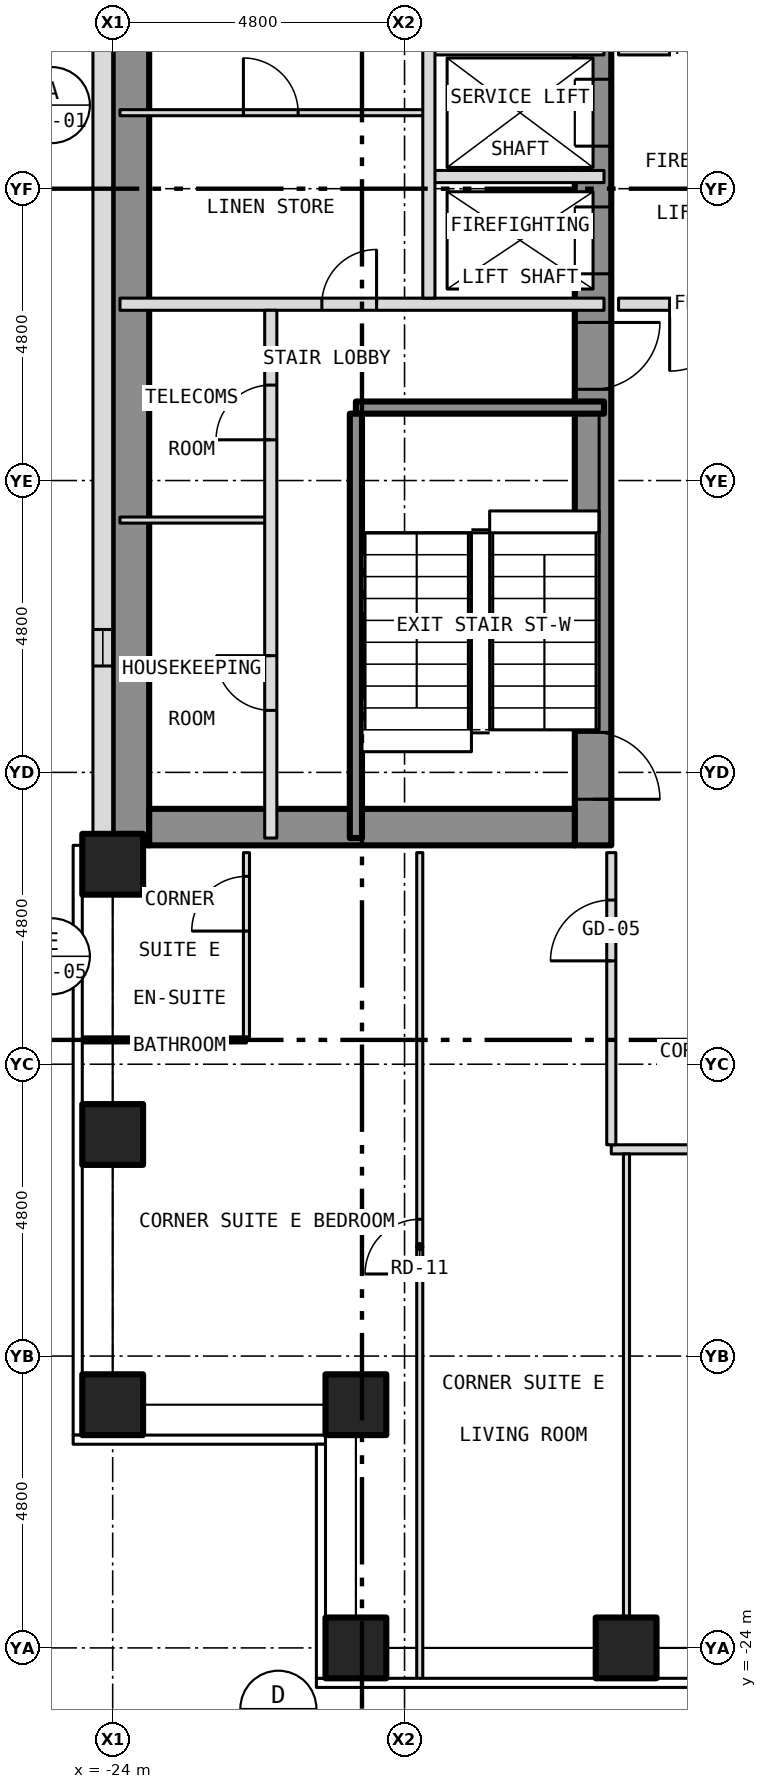
"""IFC4 building model, lengths in metres.
Left out: names, types, materials, properties, quantities, classifications, styles, units other than length and angle.
Written with IfcOpenShell. Run it as: python <this file> out.ifc"""

import sys

from ifc_helpers import new_model, si_unit, direction, frame, frame_2d, origin, origin_2d, place, context, subcontext, project, spatial, rectangle, hollow_rectangle, extrude, element, fill, save


model = new_model("IFC4")
c1 = context("Model", 3, precision=1e-05, world=origin(), true_north=direction((0.0, 1.0)))
c2 = subcontext(c1, "Body", "Model", "MODEL_VIEW")
j1 = project(units=[si_unit("LENGTHUNIT", "METRE"), si_unit("PLANEANGLEUNIT", "RADIAN")], contexts=[c1])
p1 = place(None, origin())
s1 = spatial("IfcSite", under=j1, at=p1, CompositionType="ELEMENT")
p2 = place(p1, origin())
s2 = spatial("IfcBuilding", under=s1, at=p2, CompositionType="ELEMENT")
p3 = place(p2, frame((0.0, 0.0, 67.0)))
s3 = spatial("IfcBuildingStorey", under=s2, at=p3, CompositionType="ELEMENT", Elevation=67.0)
for number, where, z_axis, x_axis in (
    (1, (-20.0, -24.0, -0.15), (0.0, 0.0, 1.0), (1.0, 0.0, 0.0)),
    (2, (-15.556, -24.0, -0.15), (0.0, 0.0, 1.0), (1.0, 0.0, 0.0)),
    (3, (-24.0, -20.0, -0.15), (0.0, 0.0, 1.0), (1.0, 0.0, 0.0)),
    (4, (-24.0, -15.556, -0.15), (0.0, 0.0, 1.0), (1.0, 0.0, 0.0)),
    (5, (-24.0, -11.111, -0.15), (0.0, 0.0, 1.0), (1.0, 0.0, 0.0)),
    (6, (-20.0, -20.0, -0.15), (0.0, 0.0, 1.0), (1.0, 0.0, 0.0)),
):
    element("IfcColumn", number, at=place(p3, frame(where, z_axis=z_axis, x_axis=x_axis)), inside=s3, PredefinedType="COLUMN", context=c2, shape_type="SweptSolid", body=[
        extrude(hollow_rectangle(XDim=1.0, YDim=1.0, WallThickness=0.06, at=origin_2d()), origin(), (0.0, 0.0, 1.0), 3.5),
    ])
p4 = place(p3, frame((-16.1, -10.8, 0.0), z_axis=(0.0, 0.0, 1.0), x_axis=(0.0, 1.0, 0.0)))
e7 = element("IfcWall", 7, at=p4, inside=s3, PredefinedType="SHEAR", context=c2, shape_type="SweptSolid", body=[
    extrude(rectangle(XDim=21.6, YDim=0.6, at=frame_2d((10.8, 0.0))), origin(), (0.0, 0.0, 1.0), 3.25),
])
p5 = place(p4, frame((9.4, 0.0, 0.0)))
e8 = element("IfcOpeningElement", 8, at=p5, cuts=e7, PredefinedType="OPENING", context=c2, shape_type="SweptSolid", body=[
    extrude(rectangle(XDim=1.1, YDim=2.1, at=frame_2d((0.55, 1.05))), frame((0.0, 0.312, 0.0), z_axis=(0.0, -1.0, 0.0), x_axis=(1.0, 0.0, 0.0)), (0.0, 0.0, 1.0), 0.624),
])
p6 = place(p4, frame((11.5, 0.0, 0.0)))
e9 = element("IfcOpeningElement", 9, at=p6, cuts=e7, PredefinedType="OPENING", context=c2, shape_type="SweptSolid", body=[
    extrude(rectangle(XDim=1.1, YDim=2.1, at=frame_2d((0.55, 1.05))), frame((0.0, 0.312, 0.0), z_axis=(0.0, -1.0, 0.0), x_axis=(1.0, 0.0, 0.0)), (0.0, 0.0, 1.0), 0.624),
])
p7 = place(p4, frame((13.6, 0.0, 0.0)))
e10 = element("IfcOpeningElement", 10, at=p7, cuts=e7, PredefinedType="OPENING", context=c2, shape_type="SweptSolid", body=[
    extrude(rectangle(XDim=1.1, YDim=2.1, at=frame_2d((0.55, 1.05))), frame((0.0, 0.312, 0.0), z_axis=(0.0, -1.0, 0.0), x_axis=(1.0, 0.0, 0.0)), (0.0, 0.0, 1.0), 0.624),
])
p8 = place(p4, frame((15.7, 0.0, 0.0)))
e11 = element("IfcOpeningElement", 11, at=p8, cuts=e7, PredefinedType="OPENING", context=c2, shape_type="SweptSolid", body=[
    extrude(rectangle(XDim=1.1, YDim=2.1, at=frame_2d((0.55, 1.05))), frame((0.0, 0.312, 0.0), z_axis=(0.0, -1.0, 0.0), x_axis=(1.0, 0.0, 0.0)), (0.0, 0.0, 1.0), 0.624),
])
p9 = place(p4, frame((17.8, 0.0, 0.0)))
e12 = element("IfcOpeningElement", 12, at=p9, cuts=e7, PredefinedType="OPENING", context=c2, shape_type="SweptSolid", body=[
    extrude(rectangle(XDim=1.1, YDim=2.1, at=frame_2d((0.55, 1.05))), frame((0.0, 0.312, 0.0), z_axis=(0.0, -1.0, 0.0), x_axis=(1.0, 0.0, 0.0)), (0.0, 0.0, 1.0), 0.624),
])
p10 = place(p4, frame((0.758, 0.0, 0.0)))
e13 = element("IfcOpeningElement", 13, at=p10, cuts=e7, PredefinedType="OPENING", context=c2, shape_type="SweptSolid", body=[
    extrude(rectangle(XDim=1.1, YDim=2.1, at=frame_2d((0.55, 1.05))), frame((0.0, 0.312, 0.0), z_axis=(0.0, -1.0, 0.0), x_axis=(1.0, 0.0, 0.0)), (0.0, 0.0, 1.0), 0.624),
])
p11 = place(p4, frame((7.5, 0.0, 0.0)))
e14 = element("IfcOpeningElement", 14, at=p11, cuts=e7, PredefinedType="OPENING", context=c2, shape_type="SweptSolid", body=[
    extrude(rectangle(XDim=1.1, YDim=2.1, at=frame_2d((0.55, 1.05))), frame((0.0, 0.312, 0.0), z_axis=(0.0, -1.0, 0.0), x_axis=(1.0, 0.0, 0.0)), (0.0, 0.0, 1.0), 0.624),
])
p12 = place(p3, frame((-23.7, -10.8, 0.0), z_axis=(0.0, 0.0, 1.0), x_axis=(0.0, 1.0, 0.0)))
e15 = element("IfcWall", 15, at=p12, inside=s3, PredefinedType="SHEAR", context=c2, shape_type="SweptSolid", body=[
    extrude(rectangle(XDim=21.6, YDim=0.6, at=frame_2d((10.8, 0.0))), origin(), (0.0, 0.0, 1.0), 3.25),
])
p13 = place(p3, frame((-23.4, -10.5, 0.0), z_axis=(0.0, 0.0, 1.0), x_axis=(1.0, 0.0, 0.0)))
e16 = element("IfcWall", 16, at=p13, inside=s3, PredefinedType="SHEAR", context=c2, shape_type="SweptSolid", body=[
    extrude(rectangle(XDim=7.0, YDim=0.6, at=frame_2d((3.5, 0.0))), origin(), (0.0, 0.0, 1.0), 3.25),
])
p14 = place(p3, frame((-24.163, 10.8, 0.0), z_axis=(0.0, 0.0, 1.0), x_axis=(0.0, -1.0, 0.0)))
e17 = element("IfcWall", 17, at=p14, inside=s3, PredefinedType="SOLIDWALL", context=c2, shape_type="SweptSolid", body=[
    extrude(rectangle(XDim=21.6, YDim=0.325, at=frame_2d((10.8, 0.0))), origin(), (0.0, 0.0, 1.0), 3.5),
])
p15 = place(p14, frame((18.05, 0.0, 1.0)))
e18 = element("IfcOpeningElement", 18, at=p15, cuts=e17, PredefinedType="OPENING", context=c2, shape_type="SweptSolid", body=[
    extrude(rectangle(XDim=0.6, YDim=1.5, at=frame_2d((0.3, 0.75))), frame((0.0, 0.175, 0.0), z_axis=(0.0, -1.0, 0.0), x_axis=(1.0, 0.0, 0.0)), (0.0, 0.0, 1.0), 0.349),
])
p16 = place(p3, frame((-15.8, -15.8, 0.0), z_axis=(0.0, 0.0, 1.0), x_axis=(1.0, 0.0, 0.0)))
e19 = element("IfcWall", 19, at=p16, inside=s3, PredefinedType="PARTITIONING", context=c2, shape_type="SweptSolid", body=[
    extrude(rectangle(XDim=6.65, YDim=0.15, at=frame_2d((3.325, 0.0))), origin(), (0.0, 0.0, 1.0), 3.35),
])
p17 = place(p16, frame((1.847, 0.0, 0.0)))
e20 = element("IfcOpeningElement", 20, at=p17, cuts=e19, PredefinedType="OPENING", context=c2, shape_type="SweptSolid", body=[
    extrude(rectangle(XDim=1.0, YDim=2.1, at=frame_2d((0.5, 1.05))), frame((0.0, 0.087, 0.0), z_axis=(0.0, -1.0, 0.0), x_axis=(1.0, 0.0, 0.0)), (0.0, 0.0, 1.0), 0.174),
])
p18 = place(p3, frame((-24.53, -14.0, 0.0), z_axis=(0.0, 0.0, 1.0), x_axis=(1.0, 0.0, 0.0)))
e21 = element("IfcWall", 21, at=p18, inside=s3, PredefinedType="PARTITIONING", context=c2, shape_type="SweptSolid", body=[
    extrude(rectangle(XDim=2.73, YDim=0.1, at=frame_2d((1.365, 0.0))), origin(), (0.0, 0.0, 1.0), 3.35),
])
p19 = place(p3, frame((-23.88, -5.45, 0.0), z_axis=(0.0, 0.0, 1.0), x_axis=(1.0, 0.0, 0.0)))
e22 = element("IfcWall", 22, at=p19, inside=s3, PredefinedType="PARTITIONING", context=c2, shape_type="SweptSolid", body=[
    extrude(rectangle(XDim=2.48, YDim=0.1, at=frame_2d((1.24, 0.0))), origin(), (0.0, 0.0, 1.0), 3.25),
])
p20 = place(p3, frame((-20.0, -3.6, 0.0), z_axis=(0.0, 0.0, 1.0), x_axis=(1.0, 0.0, 0.0)))
e23 = element("IfcWall", 23, at=p20, inside=s3, PredefinedType="SHEAR", context=c2, shape_type="SweptSolid", body=[
    extrude(rectangle(XDim=4.08, YDim=0.2, at=frame_2d((2.04, 0.0))), origin(), (0.0, 0.0, 1.0), 3.25),
])
p21 = place(p3, frame((-23.88, -1.9, 0.0), z_axis=(0.0, 0.0, 1.0), x_axis=(1.0, 0.0, 0.0)))
e24 = element("IfcWall", 24, at=p21, inside=s3, PredefinedType="PARTITIONING", context=c2, shape_type="SweptSolid", body=[
    extrude(rectangle(XDim=7.96, YDim=0.2, at=frame_2d((3.98, 0.0))), origin(), (0.0, 0.0, 1.0), 3.25),
])
p22 = place(p21, frame((3.32, 0.0, 0.0)))
e25 = element("IfcOpeningElement", 25, at=p22, cuts=e24, PredefinedType="OPENING", context=c2, shape_type="SweptSolid", body=[
    extrude(rectangle(XDim=0.9, YDim=2.1, at=frame_2d((0.45, 1.05))), frame((0.0, 0.112, 0.0), z_axis=(0.0, -1.0, 0.0), x_axis=(1.0, 0.0, 0.0)), (0.0, 0.0, 1.0), 0.224),
])
p23 = place(p3, frame((-15.68, -1.9, 0.0), z_axis=(0.0, 0.0, 1.0), x_axis=(1.0, 0.0, 0.0)))
e26 = element("IfcWall", 26, at=p23, inside=s3, PredefinedType="PARTITIONING", context=c2, shape_type="SweptSolid", body=[
    extrude(rectangle(XDim=3.28, YDim=0.2, at=frame_2d((1.64, 0.0))), origin(), (0.0, 0.0, 1.0), 3.35),
])
p24 = place(p23, frame((0.84, 0.0, 0.0)))
e27 = element("IfcOpeningElement", 27, at=p24, cuts=e26, PredefinedType="OPENING", context=c2, shape_type="SweptSolid", body=[
    extrude(rectangle(XDim=1.1, YDim=2.1, at=frame_2d((0.55, 1.05))), frame((0.0, 0.112, 0.0), z_axis=(0.0, -1.0, 0.0), x_axis=(1.0, 0.0, 0.0)), (0.0, 0.0, 1.0), 0.224),
])
p25 = place(p3, frame((-18.8, 0.2, 0.0), z_axis=(0.0, 0.0, 1.0), x_axis=(1.0, 0.0, 0.0)))
e28 = element("IfcWall", 28, at=p25, inside=s3, PredefinedType="PARTITIONING", context=c2, shape_type="SweptSolid", body=[
    extrude(rectangle(XDim=2.88, YDim=0.2, at=frame_2d((1.44, 0.0))), origin(), (0.0, 0.0, 1.0), 3.25),
])
p26 = place(p3, frame((-23.88, 1.25, 0.0), z_axis=(0.0, 0.0, 1.0), x_axis=(1.0, 0.0, 0.0)))
e29 = element("IfcWall", 29, at=p26, inside=s3, PredefinedType="PARTITIONING", context=c2, shape_type="SweptSolid", body=[
    extrude(rectangle(XDim=5.08, YDim=0.1, at=frame_2d((2.54, 0.0))), origin(), (0.0, 0.0, 1.0), 3.25),
])
p27 = place(p26, frame((2.03, 0.0, 0.0)))
e30 = element("IfcOpeningElement", 30, at=p27, cuts=e29, PredefinedType="OPENING", context=c2, shape_type="SweptSolid", body=[
    extrude(rectangle(XDim=0.9, YDim=2.1, at=frame_2d((0.45, 1.05))), frame((0.0, 0.062, 0.0), z_axis=(0.0, -1.0, 0.0), x_axis=(1.0, 0.0, 0.0)), (0.0, 0.0, 1.0), 0.124),
])
p28 = place(p3, frame((-18.8, 2.3, 0.0), z_axis=(0.0, 0.0, 1.0), x_axis=(1.0, 0.0, 0.0)))
e31 = element("IfcWall", 31, at=p28, inside=s3, PredefinedType="PARTITIONING", context=c2, shape_type="SweptSolid", body=[
    extrude(rectangle(XDim=2.88, YDim=0.2, at=frame_2d((1.44, 0.0))), origin(), (0.0, 0.0, 1.0), 3.25),
])
p29 = place(p3, frame((-15.68, 2.3, 0.0), z_axis=(0.0, 0.0, 1.0), x_axis=(1.0, 0.0, 0.0)))
e32 = element("IfcWall", 32, at=p29, inside=s3, PredefinedType="PARTITIONING", context=c2, shape_type="SweptSolid", body=[
    extrude(rectangle(XDim=3.28, YDim=0.2, at=frame_2d((1.64, 0.0))), origin(), (0.0, 0.0, 1.0), 3.35),
])
p30 = place(p29, frame((0.84, 0.0, 0.0)))
e33 = element("IfcOpeningElement", 33, at=p30, cuts=e32, PredefinedType="OPENING", context=c2, shape_type="SweptSolid", body=[
    extrude(rectangle(XDim=1.1, YDim=2.1, at=frame_2d((0.55, 1.05))), frame((0.0, 0.112, 0.0), z_axis=(0.0, -1.0, 0.0), x_axis=(1.0, 0.0, 0.0)), (0.0, 0.0, 1.0), 0.224),
])
p31 = place(p3, frame((-21.8, -13.95, 0.0), z_axis=(0.0, 0.0, 1.0), x_axis=(0.0, 1.0, 0.0)))
e34 = element("IfcWall", 34, at=p31, inside=s3, PredefinedType="PARTITIONING", context=c2, shape_type="SweptSolid", body=[
    extrude(rectangle(XDim=3.03, YDim=0.1, at=frame_2d((1.515, 0.0))), origin(), (0.0, 0.0, 1.0), 3.35),
])
p32 = place(p31, frame((1.74, 0.0, 0.0)))
e35 = element("IfcOpeningElement", 35, at=p32, cuts=e34, PredefinedType="OPENING", context=c2, shape_type="SweptSolid", body=[
    extrude(rectangle(XDim=0.9, YDim=2.1, at=frame_2d((0.45, 1.05))), frame((0.0, 0.062, 0.0), z_axis=(0.0, -1.0, 0.0), x_axis=(1.0, 0.0, 0.0)), (0.0, 0.0, 1.0), 0.124),
])
p33 = place(p3, frame((-21.4, -10.68, 0.0), z_axis=(0.0, 0.0, 1.0), x_axis=(0.0, 1.0, 0.0)))
e36 = element("IfcWall", 36, at=p33, inside=s3, PredefinedType="PARTITIONING", context=c2, shape_type="SweptSolid", body=[
    extrude(rectangle(XDim=8.68, YDim=0.2, at=frame_2d((4.34, 0.0))), origin(), (0.0, 0.0, 1.0), 3.25),
])
p34 = place(p33, frame((2.1, 0.0, 0.0)))
e37 = element("IfcOpeningElement", 37, at=p34, cuts=e36, PredefinedType="OPENING", context=c2, shape_type="SweptSolid", body=[
    extrude(rectangle(XDim=0.9, YDim=2.1, at=frame_2d((0.45, 1.05))), frame((0.0, 0.112, 0.0), z_axis=(0.0, -1.0, 0.0), x_axis=(1.0, 0.0, 0.0)), (0.0, 0.0, 1.0), 0.224),
])
p35 = place(p33, frame((6.55, 0.0, 0.0)))
e38 = element("IfcOpeningElement", 38, at=p35, cuts=e36, PredefinedType="OPENING", context=c2, shape_type="SweptSolid", body=[
    extrude(rectangle(XDim=0.9, YDim=2.1, at=frame_2d((0.45, 1.05))), frame((0.0, 0.112, 0.0), z_axis=(0.0, -1.0, 0.0), x_axis=(1.0, 0.0, 0.0)), (0.0, 0.0, 1.0), 0.224),
])
p36 = place(p3, frame((-20.0, -10.68, 0.0), z_axis=(0.0, 0.0, 1.0), x_axis=(0.0, 1.0, 0.0)))
e39 = element("IfcWall", 39, at=p36, inside=s3, PredefinedType="SHEAR", context=c2, shape_type="SweptSolid", body=[
    extrude(rectangle(XDim=6.98, YDim=0.2, at=frame_2d((3.49, 0.0))), origin(), (0.0, 0.0, 1.0), 3.25),
])
p37 = place(p3, frame((-18.95, -24.53, 0.0), z_axis=(0.0, 0.0, 1.0), x_axis=(0.0, 1.0, 0.0)))
e40 = element("IfcWall", 40, at=p37, inside=s3, PredefinedType="PARTITIONING", context=c2, shape_type="SweptSolid", body=[
    extrude(rectangle(XDim=13.61, YDim=0.1, at=frame_2d((6.805, 0.0))), origin(), (0.0, 0.0, 1.0), 3.35),
])
p38 = place(p37, frame((6.68, 0.0, 0.0)))
e41 = element("IfcOpeningElement", 41, at=p38, cuts=e40, PredefinedType="OPENING", context=c2, shape_type="SweptSolid", body=[
    extrude(rectangle(XDim=0.9, YDim=2.1, at=frame_2d((0.45, 1.05))), frame((0.0, 0.062, 0.0), z_axis=(0.0, -1.0, 0.0), x_axis=(1.0, 0.0, 0.0)), (0.0, 0.0, 1.0), 0.124),
])
p39 = place(p3, frame((-18.8, -1.8, 0.0), z_axis=(0.0, 0.0, 1.0), x_axis=(0.0, 1.0, 0.0)))
e42 = element("IfcWall", 42, at=p39, inside=s3, PredefinedType="PARTITIONING", context=c2, shape_type="SweptSolid", body=[
    extrude(rectangle(XDim=12.48, YDim=0.2, at=frame_2d((6.24, 0.0))), origin(), (0.0, 0.0, 1.0), 3.25),
])
p40 = place(p3, frame((-15.8, -15.725, 0.0), z_axis=(0.0, 0.0, 1.0), x_axis=(0.0, 1.0, 0.0)))
e43 = element("IfcWall", 43, at=p40, inside=s3, PredefinedType="PARTITIONING", context=c2, shape_type="SweptSolid", body=[
    extrude(rectangle(XDim=4.805, YDim=0.15, at=frame_2d((2.403, 0.0))), origin(), (0.0, 0.0, 1.0), 3.35),
])
p41 = place(p40, frame((3.025, 0.0, 0.0)))
e44 = element("IfcOpeningElement", 44, at=p41, cuts=e43, PredefinedType="OPENING", context=c2, shape_type="SweptSolid", body=[
    extrude(rectangle(XDim=1.0, YDim=2.1, at=frame_2d((0.5, 1.05))), frame((0.0, 0.087, 0.0), z_axis=(0.0, -1.0, 0.0), x_axis=(1.0, 0.0, 0.0)), (0.0, 0.0, 1.0), 0.174),
])
p42 = place(p3, frame((-15.55, -23.88, 0.0), z_axis=(0.0, 0.0, 1.0), x_axis=(0.0, 1.0, 0.0)))
e45 = element("IfcWall", 45, at=p42, inside=s3, PredefinedType="PARTITIONING", context=c2, shape_type="SweptSolid", body=[
    extrude(rectangle(XDim=8.005, YDim=0.1, at=frame_2d((4.002, 0.0))), origin(), (0.0, 0.0, 1.0), 3.35),
])
p43 = place(p15, origin())
e46 = element("IfcWindow", 46, at=p43, inside=s3, PartitioningType="SINGLE_PANEL", PredefinedType="WINDOW", context=c2, shape_type="SweptSolid", body=[
    extrude(rectangle(XDim=0.6, YDim=1.5, at=frame_2d((0.3, 0.75))), frame((0.0, -0.073, 0.0), z_axis=(0.0, -1.0, 0.0), x_axis=(1.0, 0.0, 0.0)), (0.0, 0.0, 1.0), 0.06),
])
fill(e18, e46)
p44 = place(p5, origin())
e47 = element("IfcDoor", 47, at=p44, inside=s3, OperationType="SLIDING_TO_LEFT", PredefinedType="DOOR", context=c2, shape_type="SweptSolid", body=[
    extrude(rectangle(XDim=1.1, YDim=2.1, at=frame_2d((0.55, 1.05))), frame((0.0, 0.025, 0.0), z_axis=(0.0, -1.0, 0.0), x_axis=(1.0, 0.0, 0.0)), (0.0, 0.0, 1.0), 0.05),
])
fill(e8, e47)
p45 = place(p6, origin())
e48 = element("IfcDoor", 48, at=p45, inside=s3, OperationType="SLIDING_TO_LEFT", PredefinedType="DOOR", context=c2, shape_type="SweptSolid", body=[
    extrude(rectangle(XDim=1.1, YDim=2.1, at=frame_2d((0.55, 1.05))), frame((0.0, 0.025, 0.0), z_axis=(0.0, -1.0, 0.0), x_axis=(1.0, 0.0, 0.0)), (0.0, 0.0, 1.0), 0.05),
])
fill(e9, e48)
p46 = place(p10, origin())
e49 = element("IfcDoor", 49, at=p46, inside=s3, OperationType="SINGLE_SWING_LEFT", PredefinedType="DOOR", context=c2, shape_type="SweptSolid", body=[
    extrude(rectangle(XDim=1.1, YDim=2.1, at=frame_2d((0.55, 1.05))), frame((0.0, 0.025, 0.0), z_axis=(0.0, -1.0, 0.0), x_axis=(1.0, 0.0, 0.0)), (0.0, 0.0, 1.0), 0.05),
])
fill(e13, e49)
p47 = place(p11, origin())
e50 = element("IfcDoor", 50, at=p47, inside=s3, OperationType="SINGLE_SWING_RIGHT", PredefinedType="DOOR", context=c2, shape_type="SweptSolid", body=[
    extrude(rectangle(XDim=1.1, YDim=2.1, at=frame_2d((0.55, 1.05))), frame((0.0, 0.025, 0.0), z_axis=(0.0, -1.0, 0.0), x_axis=(1.0, 0.0, 0.0)), (0.0, 0.0, 1.0), 0.05),
])
fill(e14, e50)
p48 = place(p34, origin())
e51 = element("IfcDoor", 51, at=p48, inside=s3, OperationType="SINGLE_SWING_RIGHT", PredefinedType="DOOR", context=c2, shape_type="SweptSolid", body=[
    extrude(rectangle(XDim=0.9, YDim=2.1, at=frame_2d((0.45, 1.05))), frame((0.0, 0.025, 0.0), z_axis=(0.0, -1.0, 0.0), x_axis=(1.0, 0.0, 0.0)), (0.0, 0.0, 1.0), 0.05),
])
fill(e37, e51)
p49 = place(p35, origin())
e52 = element("IfcDoor", 52, at=p49, inside=s3, OperationType="SINGLE_SWING_LEFT", PredefinedType="DOOR", context=c2, shape_type="SweptSolid", body=[
    extrude(rectangle(XDim=0.9, YDim=2.1, at=frame_2d((0.45, 1.05))), frame((0.0, 0.025, 0.0), z_axis=(0.0, -1.0, 0.0), x_axis=(1.0, 0.0, 0.0)), (0.0, 0.0, 1.0), 0.05),
])
fill(e38, e52)
p50 = place(p22, origin())
e53 = element("IfcDoor", 53, at=p50, inside=s3, OperationType="SINGLE_SWING_RIGHT", PredefinedType="DOOR", context=c2, shape_type="SweptSolid", body=[
    extrude(rectangle(XDim=0.9, YDim=2.1, at=frame_2d((0.45, 1.05))), frame((0.0, 0.025, 0.0), z_axis=(0.0, -1.0, 0.0), x_axis=(1.0, 0.0, 0.0)), (0.0, 0.0, 1.0), 0.05),
])
fill(e25, e53)
p51 = place(p27, origin())
e54 = element("IfcDoor", 54, at=p51, inside=s3, OperationType="SINGLE_SWING_LEFT", PredefinedType="DOOR", context=c2, shape_type="SweptSolid", body=[
    extrude(rectangle(XDim=0.9, YDim=2.1, at=frame_2d((0.45, 1.05))), frame((0.0, 0.025, 0.0), z_axis=(0.0, -1.0, 0.0), x_axis=(1.0, 0.0, 0.0)), (0.0, 0.0, 1.0), 0.05),
])
fill(e30, e54)
p52 = place(p24, origin())
e55 = element("IfcDoor", 55, at=p52, inside=s3, OperationType="SINGLE_SWING_LEFT", PredefinedType="DOOR", context=c2, shape_type="SweptSolid", body=[
    extrude(rectangle(XDim=1.1, YDim=2.1, at=frame_2d((0.55, 1.05))), frame((0.0, 0.025, 0.0), z_axis=(0.0, -1.0, 0.0), x_axis=(1.0, 0.0, 0.0)), (0.0, 0.0, 1.0), 0.05),
])
fill(e27, e55)
p53 = place(p41, origin())
e56 = element("IfcDoor", 56, at=p53, inside=s3, OperationType="SINGLE_SWING_LEFT", PredefinedType="DOOR", context=c2, shape_type="SweptSolid", body=[
    extrude(rectangle(XDim=1.0, YDim=2.1, at=frame_2d((0.5, 1.05))), frame((0.0, 0.025, 0.0), z_axis=(0.0, -1.0, 0.0), x_axis=(1.0, 0.0, 0.0)), (0.0, 0.0, 1.0), 0.05),
])
fill(e44, e56)
p54 = place(p38, origin())
e57 = element("IfcDoor", 57, at=p54, inside=s3, OperationType="SINGLE_SWING_LEFT", PredefinedType="DOOR", context=c2, shape_type="SweptSolid", body=[
    extrude(rectangle(XDim=0.9, YDim=2.1, at=frame_2d((0.45, 1.05))), frame((0.0, 0.025, 0.0), z_axis=(0.0, -1.0, 0.0), x_axis=(1.0, 0.0, 0.0)), (0.0, 0.0, 1.0), 0.05),
])
fill(e41, e57)
p55 = place(p32, origin())
e58 = element("IfcDoor", 58, at=p55, inside=s3, OperationType="SINGLE_SWING_LEFT", PredefinedType="DOOR", context=c2, shape_type="SweptSolid", body=[
    extrude(rectangle(XDim=0.9, YDim=2.1, at=frame_2d((0.45, 1.05))), frame((0.0, 0.025, 0.0), z_axis=(0.0, -1.0, 0.0), x_axis=(1.0, 0.0, 0.0)), (0.0, 0.0, 1.0), 0.05),
])
fill(e35, e58)
save(model, sys.argv[1])
